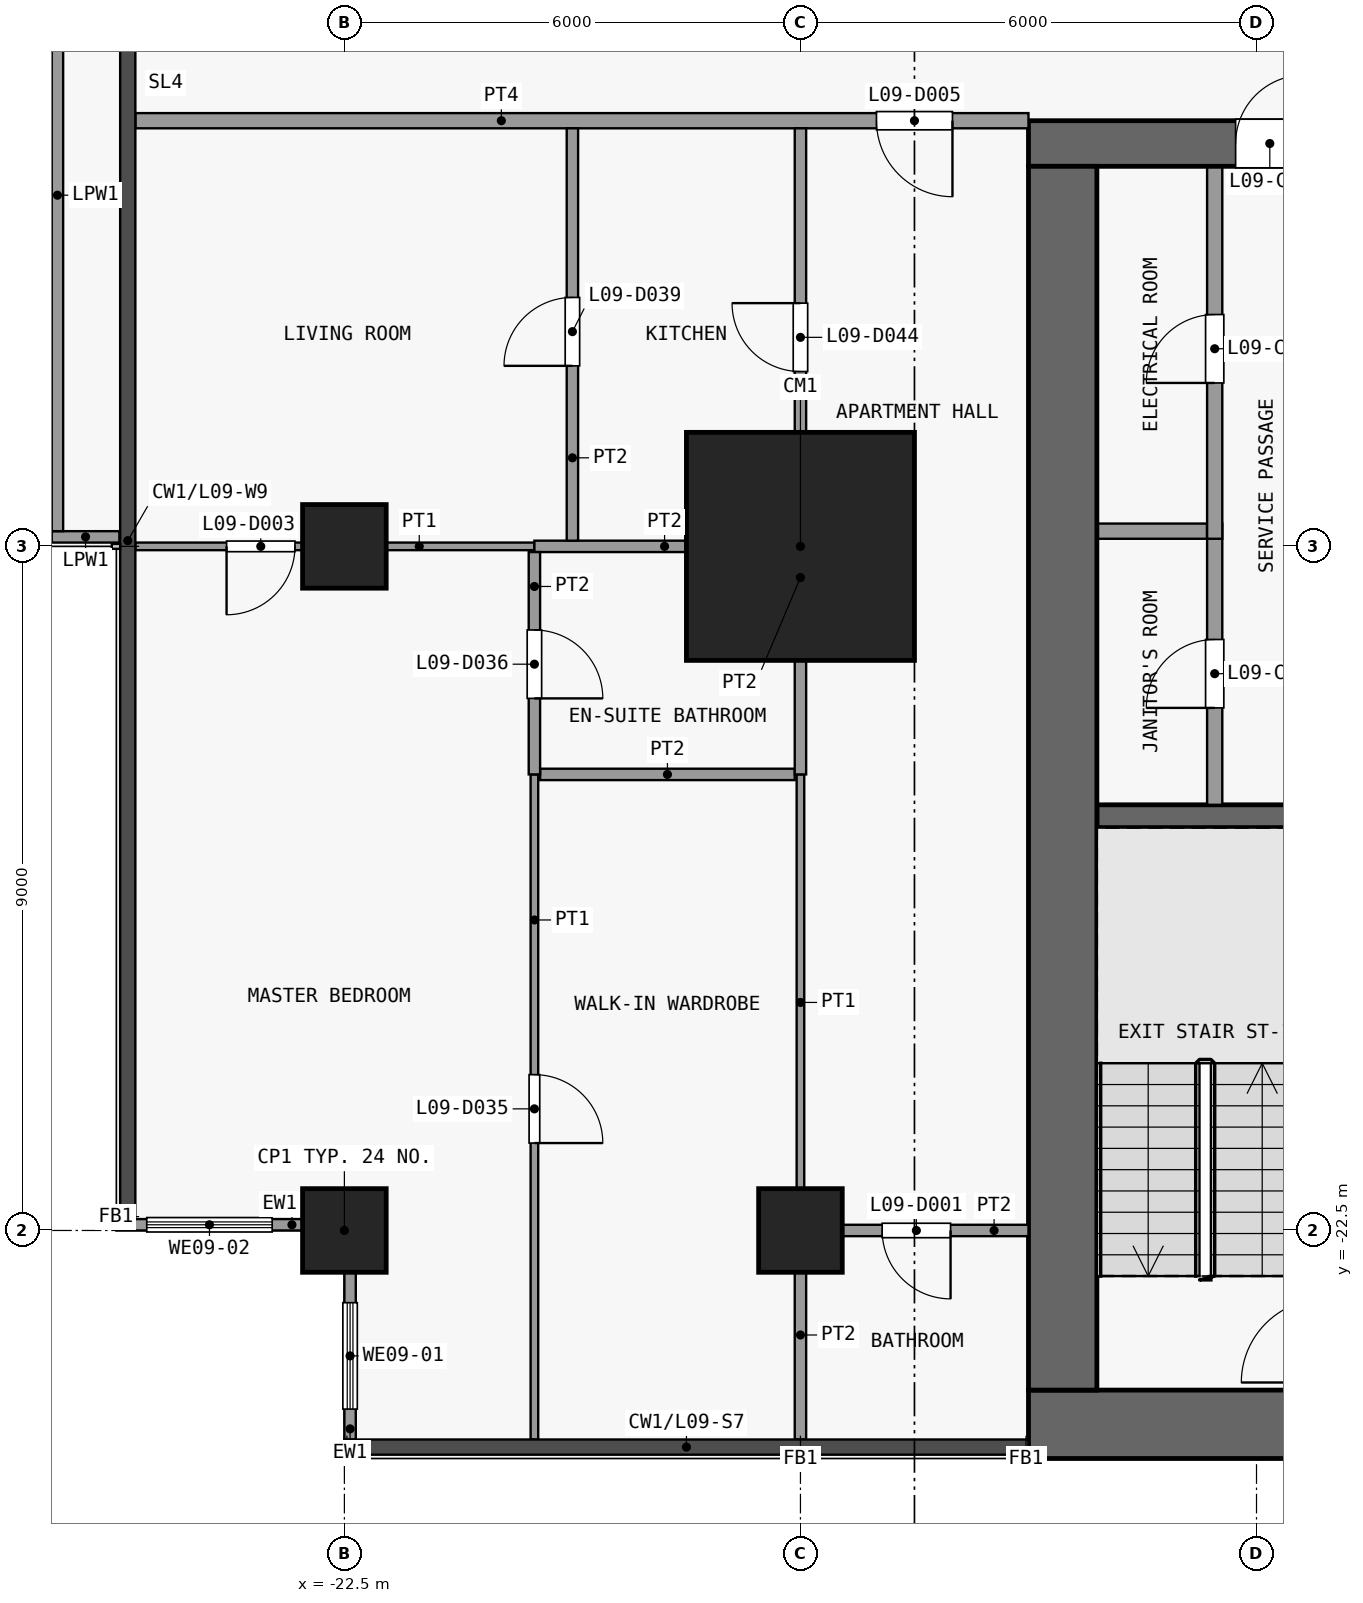
"""IFC4 building model, lengths in metres.
Left out: names, types, materials, properties, quantities, classifications, styles, units other than length and angle.
Written with IfcOpenShell. Run it as: python <this file> out.ifc"""

import sys

from ifc_helpers import new_model, si_unit, direction, frame, frame_2d, origin, origin_2d, place, context, subcontext, project, spatial, rectangle, extrude, element, fill, save


model = new_model("IFC4")
c1 = context("Model", 3, precision=1e-05, world=origin(), true_north=direction((0.0, 1.0)))
c2 = subcontext(c1, "Body", "Model", "MODEL_VIEW")
j1 = project(units=[si_unit("LENGTHUNIT", "METRE"), si_unit("PLANEANGLEUNIT", "RADIAN")], contexts=[c1])
p1 = place(None, origin())
s1 = spatial("IfcSite", under=j1, at=p1, CompositionType="ELEMENT")
p2 = place(p1, origin())
s2 = spatial("IfcBuilding", under=s1, at=p2, CompositionType="ELEMENT")
p3 = place(p2, frame((0.0, 0.0, 43.3)))
s3 = spatial("IfcBuildingStorey", under=s2, at=p3, CompositionType="ELEMENT", Elevation=43.3)
for number, where, z_axis, x_axis in (
    (1, (-22.5, -22.5, 0.0), (0.0, 0.0, 1.0), (1.0, 0.0, 0.0)),
    (2, (-22.5, -13.5, 0.0), (0.0, 0.0, 1.0), (1.0, 0.0, 0.0)),
    (3, (-16.5, -22.5, 0.0), (0.0, 0.0, 1.0), (1.0, 0.0, 0.0)),
):
    element("IfcColumn", number, at=place(p3, frame(where, z_axis=z_axis, x_axis=x_axis)), inside=s3, PredefinedType="COLUMN", context=c2, shape_type="SweptSolid", body=[
        extrude(rectangle(XDim=1.1, YDim=1.1, at=origin_2d()), origin(), (0.0, 0.0, 1.0), 3.6),
    ])
p4 = place(p3, frame((-16.5, -13.5, 0.0), z_axis=(0.0, 0.0, 1.0), x_axis=(1.0, 0.0, 0.0)))
e4 = element("IfcColumn", 4, at=p4, inside=s3, PredefinedType="COLUMN", context=c2, shape_type="SweptSolid", body=[
    extrude(rectangle(XDim=3.0, YDim=3.0, at=origin_2d()), origin(), (0.0, 0.0, 1.0), 3.6),
])
p5 = place(p3, frame((-13.5, -25.05, 0.0), z_axis=(0.0, 0.0, 1.0), x_axis=(1.0, 0.0, 0.0)))
e5 = element("IfcWall", 5, at=p5, inside=s3, PredefinedType="SHEAR", context=c2, shape_type="SweptSolid", body=[
    extrude(rectangle(XDim=27.0, YDim=0.9, at=frame_2d((13.5, 0.0))), origin(), (0.0, 0.0, 1.0), 3.3),
])
p6 = place(p3, frame((-13.5, -8.2, 0.0), z_axis=(0.0, 0.0, 1.0), x_axis=(1.0, 0.0, 0.0)))
e6 = element("IfcWall", 6, at=p6, inside=s3, PredefinedType="SHEAR", context=c2, shape_type="SweptSolid", body=[
    extrude(rectangle(XDim=27.0, YDim=0.6, at=frame_2d((13.5, 0.0))), origin(), (0.0, 0.0, 1.0), 3.3),
])
p7 = place(p6, frame((7.8, 0.0, 0.0)))
e7 = element("IfcOpeningElement", 7, at=p7, cuts=e6, PredefinedType="OPENING", context=c2, shape_type="SweptSolid", body=[
    extrude(rectangle(XDim=1.8, YDim=2.1, at=frame_2d((0.9, 1.05))), frame((0.0, 0.31, 0.0), z_axis=(0.0, -1.0, 0.0), x_axis=(1.0, 0.0, 0.0)), (0.0, 0.0, 1.0), 0.62),
])
p8 = place(p6, frame((17.4, 0.0, 0.0)))
e8 = element("IfcOpeningElement", 8, at=p8, cuts=e6, PredefinedType="OPENING", context=c2, shape_type="SweptSolid", body=[
    extrude(rectangle(XDim=1.8, YDim=2.1, at=frame_2d((0.9, 1.05))), frame((0.0, 0.31, 0.0), z_axis=(0.0, -1.0, 0.0), x_axis=(1.0, 0.0, 0.0)), (0.0, 0.0, 1.0), 0.62),
])
p9 = place(p6, frame((2.725, 0.0, 0.0)))
e9 = element("IfcOpeningElement", 9, at=p9, cuts=e6, PredefinedType="OPENING", context=c2, shape_type="SweptSolid", body=[
    extrude(rectangle(XDim=0.9, YDim=2.1, at=frame_2d((0.45, 1.05))), frame((0.0, 0.31, 0.0), z_axis=(0.0, -1.0, 0.0), x_axis=(1.0, 0.0, 0.0)), (0.0, 0.0, 1.0), 0.62),
])
p10 = place(p6, frame((23.375, 0.0, 0.0)))
e10 = element("IfcOpeningElement", 10, at=p10, cuts=e6, PredefinedType="OPENING", context=c2, shape_type="SweptSolid", body=[
    extrude(rectangle(XDim=0.9, YDim=2.1, at=frame_2d((0.45, 1.05))), frame((0.0, 0.31, 0.0), z_axis=(0.0, -1.0, 0.0), x_axis=(1.0, 0.0, 0.0)), (0.0, 0.0, 1.0), 0.62),
])
p11 = place(p3, frame((-13.05, -24.6, 0.0), z_axis=(0.0, 0.0, 1.0), x_axis=(0.0, 1.0, 0.0)))
e11 = element("IfcWall", 11, at=p11, inside=s3, PredefinedType="SHEAR", context=c2, shape_type="SweptSolid", body=[
    extrude(rectangle(XDim=16.1, YDim=0.9, at=frame_2d((8.05, 0.0))), origin(), (0.0, 0.0, 1.0), 3.3),
])
p12 = place(p3, frame((-12.6, -17.05, 0.0), z_axis=(0.0, 0.0, 1.0), x_axis=(1.0, 0.0, 0.0)))
e12 = element("IfcWall", 12, at=p12, inside=s3, PredefinedType="SHEAR", context=c2, shape_type="SweptSolid", body=[
    extrude(rectangle(XDim=2.85, YDim=0.3, at=frame_2d((1.425, 0.0))), origin(), (0.0, 0.0, 1.0), 3.3),
])
p13 = place(p3, frame((-12.6, -13.3, 0.0), z_axis=(0.0, 0.0, 1.0), x_axis=(1.0, 0.0, 0.0)))
e13 = element("IfcWall", 13, at=p13, inside=s3, PredefinedType="PARTITIONING", context=c2, shape_type="SweptSolid", body=[
    extrude(rectangle(XDim=1.45, YDim=0.2, at=frame_2d((0.725, 0.0))), origin(), (0.0, 0.0, 1.0), 3.3),
])
p14 = place(p3, frame((-11.05, -16.9, 0.0), z_axis=(0.0, 0.0, 1.0), x_axis=(0.0, 1.0, 0.0)))
e14 = element("IfcWall", 14, at=p14, inside=s3, PredefinedType="PARTITIONING", context=c2, shape_type="SweptSolid", body=[
    extrude(rectangle(XDim=3.7, YDim=0.2, at=frame_2d((1.85, 0.0))), origin(), (0.0, 0.0, 1.0), 3.3),
])
p15 = place(p14, frame((1.275, 0.0, 0.0)))
e15 = element("IfcOpeningElement", 15, at=p15, cuts=e14, PredefinedType="OPENING", context=c2, shape_type="SweptSolid", body=[
    extrude(rectangle(XDim=0.9, YDim=2.1, at=frame_2d((0.45, 1.05))), frame((0.0, 0.11, 0.0), z_axis=(0.0, -1.0, 0.0), x_axis=(1.0, 0.0, 0.0)), (0.0, 0.0, 1.0), 0.22),
])
p16 = place(p3, frame((-11.05, -13.4, 0.0), z_axis=(0.0, 0.0, 1.0), x_axis=(0.0, 1.0, 0.0)))
e16 = element("IfcWall", 16, at=p16, inside=s3, PredefinedType="PARTITIONING", context=c2, shape_type="SweptSolid", body=[
    extrude(rectangle(XDim=4.9, YDim=0.2, at=frame_2d((2.45, 0.0))), origin(), (0.0, 0.0, 1.0), 3.3),
])
p17 = place(p16, frame((2.05, 0.0, 0.0)))
e17 = element("IfcOpeningElement", 17, at=p17, cuts=e16, PredefinedType="OPENING", context=c2, shape_type="SweptSolid", body=[
    extrude(rectangle(XDim=0.9, YDim=2.1, at=frame_2d((0.45, 1.05))), frame((0.0, 0.11, 0.0), z_axis=(0.0, -1.0, 0.0), x_axis=(1.0, 0.0, 0.0)), (0.0, 0.0, 1.0), 0.22),
])
p18 = place(p3, frame((-22.425, -25.25, 0.0), z_axis=(0.0, 0.0, 1.0), x_axis=(0.0, 1.0, 0.0)))
e18 = element("IfcWall", 18, at=p18, inside=s3, PredefinedType="SOLIDWALL", context=c2, shape_type="SweptSolid", body=[
    extrude(rectangle(XDim=2.2, YDim=0.15, at=frame_2d((1.1, 0.0))), origin(), (0.0, 0.0, 1.0), 3.3),
])
p19 = place(p18, frame((0.4, 0.0, 0.9)))
e19 = element("IfcOpeningElement", 19, at=p19, cuts=e18, PredefinedType="OPENING", context=c2, shape_type="SweptSolid", body=[
    extrude(rectangle(XDim=1.4, YDim=2.4, at=frame_2d((0.7, 1.2))), frame((0.0, 0.085, 0.0), z_axis=(0.0, -1.0, 0.0), x_axis=(1.0, 0.0, 0.0)), (0.0, 0.0, 1.0), 0.17),
])
p20 = place(p3, frame((-23.05, -22.425, 0.0), z_axis=(0.0, 0.0, 1.0), x_axis=(-1.0, 0.0, 0.0)))
e20 = element("IfcWall", 20, at=p20, inside=s3, PredefinedType="SOLIDWALL", context=c2, shape_type="SweptSolid", body=[
    extrude(rectangle(XDim=2.45, YDim=0.15, at=frame_2d((1.225, 0.0))), origin(), (0.0, 0.0, 1.0), 3.3),
])
p21 = place(p20, frame((0.4, 0.0, 0.9)))
e21 = element("IfcOpeningElement", 21, at=p21, cuts=e20, PredefinedType="OPENING", context=c2, shape_type="SweptSolid", body=[
    extrude(rectangle(XDim=1.65, YDim=2.4, at=frame_2d((0.825, 1.2))), frame((0.0, 0.085, 0.0), z_axis=(0.0, -1.0, 0.0), x_axis=(1.0, 0.0, 0.0)), (0.0, 0.0, 1.0), 0.17),
])
p22 = place(p3, frame((-25.46, -13.375, 0.0), z_axis=(0.0, 0.0, 1.0), x_axis=(-1.0, 0.0, 0.0)))
e22 = element("IfcWall", 22, at=p22, inside=s3, PredefinedType="PARAPET", context=c2, shape_type="SweptSolid", body=[
    extrude(rectangle(XDim=0.89, YDim=0.15, at=frame_2d((0.445, 0.0))), origin(), (0.0, 0.0, 1.0), 1.15),
])
p23 = place(p3, frame((-26.275, -13.3, 0.0), z_axis=(0.0, 0.0, 1.0), x_axis=(0.0, 1.0, 0.0)))
e23 = element("IfcWall", 23, at=p23, inside=s3, PredefinedType="PARAPET", context=c2, shape_type="SweptSolid", body=[
    extrude(rectangle(XDim=8.84, YDim=0.15, at=frame_2d((4.42, 0.0))), origin(), (0.0, 0.0, 1.0), 1.15),
])
p24 = place(p3, frame((-16.425, -22.5, 0.0), z_axis=(0.0, 0.0, 1.0), x_axis=(1.0, 0.0, 0.0)))
e24 = element("IfcWall", 24, at=p24, inside=s3, PredefinedType="PARTITIONING", context=c2, shape_type="SweptSolid", body=[
    extrude(rectangle(XDim=2.925, YDim=0.15, at=frame_2d((1.462, 0.0))), origin(), (0.0, 0.0, 1.0), 3.3),
])
p25 = place(p24, frame((1.0, 0.0, 0.0)))
e25 = element("IfcOpeningElement", 25, at=p25, cuts=e24, PredefinedType="OPENING", context=c2, shape_type="SweptSolid", body=[
    extrude(rectangle(XDim=0.9, YDim=2.1, at=frame_2d((0.45, 1.05))), frame((0.0, 0.085, 0.0), z_axis=(0.0, -1.0, 0.0), x_axis=(1.0, 0.0, 0.0)), (0.0, 0.0, 1.0), 0.17),
])
p26 = place(p3, frame((-19.925, -16.5, 0.0), z_axis=(0.0, 0.0, 1.0), x_axis=(1.0, 0.0, 0.0)))
e26 = element("IfcWall", 26, at=p26, inside=s3, PredefinedType="PARTITIONING", context=c2, shape_type="SweptSolid", body=[
    extrude(rectangle(XDim=3.35, YDim=0.15, at=frame_2d((1.675, 0.0))), origin(), (0.0, 0.0, 1.0), 3.3),
])
p27 = place(p3, frame((-25.25, -13.5, 0.0), z_axis=(0.0, 0.0, 1.0), x_axis=(1.0, 0.0, 0.0)))
e27 = element("IfcWall", 27, at=p27, inside=s3, PredefinedType="PARTITIONING", context=c2, shape_type="SweptSolid", body=[
    extrude(rectangle(XDim=5.25, YDim=0.1, at=frame_2d((2.625, 0.0))), origin(), (0.0, 0.0, 1.0), 3.3),
])
p28 = place(p27, frame((1.2, 0.0, 0.0)))
e28 = element("IfcOpeningElement", 28, at=p28, cuts=e27, PredefinedType="OPENING", context=c2, shape_type="SweptSolid", body=[
    extrude(rectangle(XDim=0.9, YDim=2.1, at=frame_2d((0.45, 1.05))), frame((0.0, 0.06, 0.0), z_axis=(0.0, -1.0, 0.0), x_axis=(1.0, 0.0, 0.0)), (0.0, 0.0, 1.0), 0.12),
])
p29 = place(p3, frame((-20.0, -13.5, 0.0), z_axis=(0.0, 0.0, 1.0), x_axis=(1.0, 0.0, 0.0)))
e29 = element("IfcWall", 29, at=p29, inside=s3, PredefinedType="PARTITIONING", context=c2, shape_type="SweptSolid", body=[
    extrude(rectangle(XDim=3.425, YDim=0.15, at=frame_2d((1.712, 0.0))), origin(), (0.0, 0.0, 1.0), 3.3),
])
p30 = place(p3, frame((-25.25, -7.9, 0.0), z_axis=(0.0, 0.0, 1.0), x_axis=(1.0, 0.0, 0.0)))
e30 = element("IfcWall", 30, at=p30, inside=s3, PredefinedType="PARTITIONING", context=c2, shape_type="SweptSolid", body=[
    extrude(rectangle(XDim=11.75, YDim=0.2, at=frame_2d((5.875, 0.0))), origin(), (0.0, 0.0, 1.0), 3.3),
])
p31 = place(p30, frame((9.75, 0.0, 0.0)))
e31 = element("IfcOpeningElement", 31, at=p31, cuts=e30, PredefinedType="OPENING", context=c2, shape_type="SweptSolid", body=[
    extrude(rectangle(XDim=1.0, YDim=2.1, at=frame_2d((0.5, 1.05))), frame((0.0, 0.11, 0.0), z_axis=(0.0, -1.0, 0.0), x_axis=(1.0, 0.0, 0.0)), (0.0, 0.0, 1.0), 0.22),
])
p32 = place(p3, frame((-20.0, -25.25, 0.0), z_axis=(0.0, 0.0, 1.0), x_axis=(0.0, 1.0, 0.0)))
e32 = element("IfcWall", 32, at=p32, inside=s3, PredefinedType="PARTITIONING", context=c2, shape_type="SweptSolid", body=[
    extrude(rectangle(XDim=8.75, YDim=0.1, at=frame_2d((4.375, 0.0))), origin(), (0.0, 0.0, 1.0), 3.3),
])
p33 = place(p32, frame((3.9, 0.0, 0.0)))
e33 = element("IfcOpeningElement", 33, at=p33, cuts=e32, PredefinedType="OPENING", context=c2, shape_type="SweptSolid", body=[
    extrude(rectangle(XDim=0.9, YDim=2.1, at=frame_2d((0.45, 1.05))), frame((0.0, 0.06, 0.0), z_axis=(0.0, -1.0, 0.0), x_axis=(1.0, 0.0, 0.0)), (0.0, 0.0, 1.0), 0.12),
])
p34 = place(p3, frame((-20.0, -16.5, 0.0), z_axis=(0.0, 0.0, 1.0), x_axis=(0.0, 1.0, 0.0)))
e34 = element("IfcWall", 34, at=p34, inside=s3, PredefinedType="PARTITIONING", context=c2, shape_type="SweptSolid", body=[
    extrude(rectangle(XDim=2.925, YDim=0.15, at=frame_2d((1.462, 0.0))), origin(), (0.0, 0.0, 1.0), 3.3),
])
p35 = place(p34, frame((1.0, 0.0, 0.0)))
e35 = element("IfcOpeningElement", 35, at=p35, cuts=e34, PredefinedType="OPENING", context=c2, shape_type="SweptSolid", body=[
    extrude(rectangle(XDim=0.9, YDim=2.1, at=frame_2d((0.45, 1.05))), frame((0.0, 0.085, 0.0), z_axis=(0.0, -1.0, 0.0), x_axis=(1.0, 0.0, 0.0)), (0.0, 0.0, 1.0), 0.17),
])
p36 = place(p3, frame((-19.5, -13.425, 0.0), z_axis=(0.0, 0.0, 1.0), x_axis=(0.0, 1.0, 0.0)))
e36 = element("IfcWall", 36, at=p36, inside=s3, PredefinedType="PARTITIONING", context=c2, shape_type="SweptSolid", body=[
    extrude(rectangle(XDim=5.425, YDim=0.15, at=frame_2d((2.712, 0.0))), origin(), (0.0, 0.0, 1.0), 3.3),
])
p37 = place(p36, frame((2.3, 0.0, 0.0)))
e37 = element("IfcOpeningElement", 37, at=p37, cuts=e36, PredefinedType="OPENING", context=c2, shape_type="SweptSolid", body=[
    extrude(rectangle(XDim=0.9, YDim=2.1, at=frame_2d((0.45, 1.05))), frame((0.0, 0.085, 0.0), z_axis=(0.0, -1.0, 0.0), x_axis=(1.0, 0.0, 0.0)), (0.0, 0.0, 1.0), 0.17),
])
p38 = place(p3, frame((-16.5, -22.5, 0.0), z_axis=(0.0, 0.0, 1.0), x_axis=(0.0, 1.0, 0.0)))
e38 = element("IfcWall", 38, at=p38, inside=s3, PredefinedType="PARTITIONING", context=c2, shape_type="SweptSolid", body=[
    extrude(rectangle(XDim=6.0, YDim=0.1, at=frame_2d((3.0, 0.0))), origin(), (0.0, 0.0, 1.0), 3.3),
])
p39 = place(p3, frame((-16.5, -25.25, 0.0), z_axis=(0.0, 0.0, 1.0), x_axis=(0.0, 1.0, 0.0)))
e39 = element("IfcWall", 39, at=p39, inside=s3, PredefinedType="PARTITIONING", context=c2, shape_type="SweptSolid", body=[
    extrude(rectangle(XDim=2.75, YDim=0.15, at=frame_2d((1.375, 0.0))), origin(), (0.0, 0.0, 1.0), 3.3),
])
p40 = place(p3, frame((-16.5, -16.5, 0.0), z_axis=(0.0, 0.0, 1.0), x_axis=(0.0, 1.0, 0.0)))
e40 = element("IfcWall", 40, at=p40, inside=s3, PredefinedType="PARTITIONING", context=c2, shape_type="SweptSolid", body=[
    extrude(rectangle(XDim=8.5, YDim=0.15, at=frame_2d((4.25, 0.0))), origin(), (0.0, 0.0, 1.0), 3.3),
])
p41 = place(p40, frame((5.3, 0.0, 0.0)))
e41 = element("IfcOpeningElement", 41, at=p41, cuts=e40, PredefinedType="OPENING", context=c2, shape_type="SweptSolid", body=[
    extrude(rectangle(XDim=0.9, YDim=2.1, at=frame_2d((0.45, 1.05))), frame((0.0, 0.085, 0.0), z_axis=(0.0, -1.0, 0.0), x_axis=(1.0, 0.0, 0.0)), (0.0, 0.0, 1.0), 0.17),
])
p42 = place(p17, origin())
e42 = element("IfcDoor", 42, at=p42, inside=s3, OperationType="SINGLE_SWING_LEFT", PredefinedType="DOOR", context=c2, shape_type="SweptSolid", body=[
    extrude(rectangle(XDim=0.9, YDim=2.1, at=frame_2d((0.45, 1.05))), frame((0.0, 0.025, 0.0), z_axis=(0.0, -1.0, 0.0), x_axis=(1.0, 0.0, 0.0)), (0.0, 0.0, 1.0), 0.05),
])
fill(e17, e42)
p43 = place(p9, origin())
e43 = element("IfcDoor", 43, at=p43, inside=s3, OperationType="SINGLE_SWING_RIGHT", PredefinedType="DOOR", context=c2, shape_type="SweptSolid", body=[
    extrude(rectangle(XDim=0.9, YDim=2.1, at=frame_2d((0.45, 1.05))), frame((0.0, 0.025, 0.0), z_axis=(0.0, -1.0, 0.0), x_axis=(1.0, 0.0, 0.0)), (0.0, 0.0, 1.0), 0.05),
])
fill(e9, e43)
p44 = place(p15, origin())
e44 = element("IfcDoor", 44, at=p44, inside=s3, OperationType="SINGLE_SWING_LEFT", PredefinedType="DOOR", context=c2, shape_type="SweptSolid", body=[
    extrude(rectangle(XDim=0.9, YDim=2.1, at=frame_2d((0.45, 1.05))), frame((0.0, 0.025, 0.0), z_axis=(0.0, -1.0, 0.0), x_axis=(1.0, 0.0, 0.0)), (0.0, 0.0, 1.0), 0.05),
])
fill(e15, e44)
p45 = place(p19, origin())
e45 = element("IfcWindow", 45, at=p45, inside=s3, PartitioningType="SINGLE_PANEL", PredefinedType="WINDOW", context=c2, shape_type="SweptSolid", body=[
    extrude(rectangle(XDim=1.4, YDim=2.4, at=frame_2d((0.7, 1.2))), frame((0.0, 0.03, 0.0), z_axis=(0.0, -1.0, 0.0), x_axis=(1.0, 0.0, 0.0)), (0.0, 0.0, 1.0), 0.06),
])
fill(e19, e45)
p46 = place(p21, origin())
e46 = element("IfcWindow", 46, at=p46, inside=s3, PartitioningType="SINGLE_PANEL", PredefinedType="WINDOW", context=c2, shape_type="SweptSolid", body=[
    extrude(rectangle(XDim=1.65, YDim=2.4, at=frame_2d((0.825, 1.2))), frame((0.0, 0.03, 0.0), z_axis=(0.0, -1.0, 0.0), x_axis=(1.0, 0.0, 0.0)), (0.0, 0.0, 1.0), 0.06),
])
fill(e21, e46)
p47 = place(p25, origin())
e47 = element("IfcDoor", 47, at=p47, inside=s3, OperationType="SINGLE_SWING_RIGHT", PredefinedType="DOOR", context=c2, shape_type="SweptSolid", body=[
    extrude(rectangle(XDim=0.9, YDim=2.1, at=frame_2d((0.45, 1.05))), frame((0.0, 0.025, 0.0), z_axis=(0.0, -1.0, 0.0), x_axis=(1.0, 0.0, 0.0)), (0.0, 0.0, 1.0), 0.05),
])
fill(e25, e47)
p48 = place(p28, origin())
e48 = element("IfcDoor", 48, at=p48, inside=s3, OperationType="SINGLE_SWING_LEFT", PredefinedType="DOOR", context=c2, shape_type="SweptSolid", body=[
    extrude(rectangle(XDim=0.9, YDim=2.1, at=frame_2d((0.45, 1.05))), frame((0.0, 0.025, 0.0), z_axis=(0.0, -1.0, 0.0), x_axis=(1.0, 0.0, 0.0)), (0.0, 0.0, 1.0), 0.05),
])
fill(e28, e48)
p49 = place(p31, origin())
e49 = element("IfcDoor", 49, at=p49, inside=s3, OperationType="SINGLE_SWING_RIGHT", PredefinedType="DOOR", context=c2, shape_type="SweptSolid", body=[
    extrude(rectangle(XDim=1.0, YDim=2.1, at=frame_2d((0.5, 1.05))), frame((0.0, 0.025, 0.0), z_axis=(0.0, -1.0, 0.0), x_axis=(1.0, 0.0, 0.0)), (0.0, 0.0, 1.0), 0.05),
])
fill(e31, e49)
p50 = place(p33, origin())
e50 = element("IfcDoor", 50, at=p50, inside=s3, OperationType="SINGLE_SWING_LEFT", PredefinedType="DOOR", context=c2, shape_type="SweptSolid", body=[
    extrude(rectangle(XDim=0.9, YDim=2.1, at=frame_2d((0.45, 1.05))), frame((0.0, 0.025, 0.0), z_axis=(0.0, -1.0, 0.0), x_axis=(1.0, 0.0, 0.0)), (0.0, 0.0, 1.0), 0.05),
])
fill(e33, e50)
p51 = place(p35, origin())
e51 = element("IfcDoor", 51, at=p51, inside=s3, OperationType="SINGLE_SWING_LEFT", PredefinedType="DOOR", context=c2, shape_type="SweptSolid", body=[
    extrude(rectangle(XDim=0.9, YDim=2.1, at=frame_2d((0.45, 1.05))), frame((0.0, 0.025, 0.0), z_axis=(0.0, -1.0, 0.0), x_axis=(1.0, 0.0, 0.0)), (0.0, 0.0, 1.0), 0.05),
])
fill(e35, e51)
p52 = place(p37, origin())
e52 = element("IfcDoor", 52, at=p52, inside=s3, OperationType="SINGLE_SWING_RIGHT", PredefinedType="DOOR", context=c2, shape_type="SweptSolid", body=[
    extrude(rectangle(XDim=0.9, YDim=2.1, at=frame_2d((0.45, 1.05))), frame((0.0, 0.025, 0.0), z_axis=(0.0, -1.0, 0.0), x_axis=(1.0, 0.0, 0.0)), (0.0, 0.0, 1.0), 0.05),
])
fill(e37, e52)
p53 = place(p41, origin())
e53 = element("IfcDoor", 53, at=p53, inside=s3, OperationType="SINGLE_SWING_LEFT", PredefinedType="DOOR", context=c2, shape_type="SweptSolid", body=[
    extrude(rectangle(XDim=0.9, YDim=2.1, at=frame_2d((0.45, 1.05))), frame((0.0, 0.025, 0.0), z_axis=(0.0, -1.0, 0.0), x_axis=(1.0, 0.0, 0.0)), (0.0, 0.0, 1.0), 0.05),
])
fill(e41, e53)
save(model, sys.argv[1])
